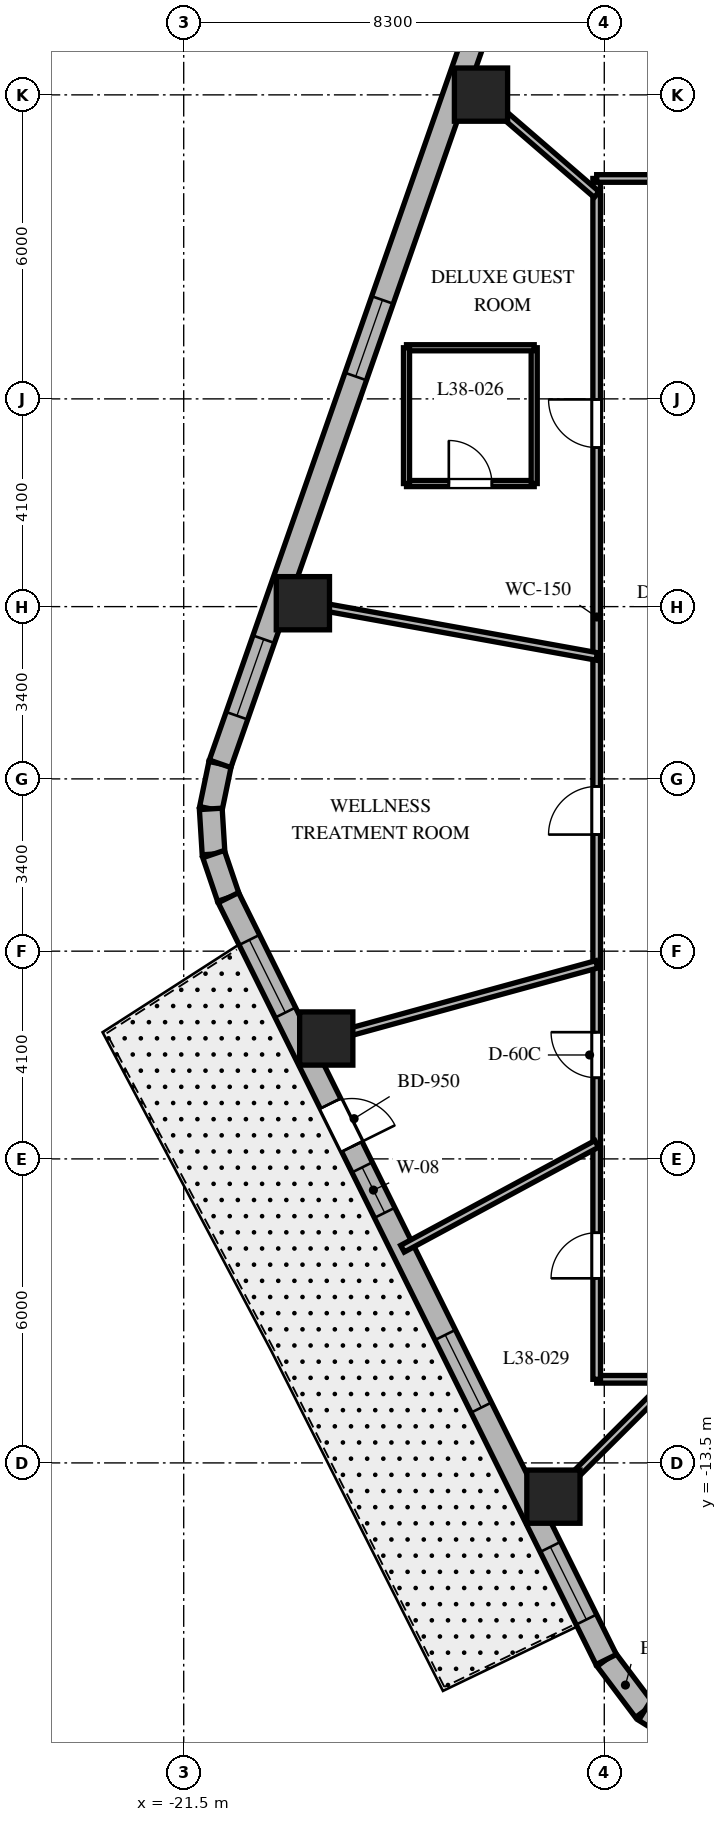
"""IFC4 building model, lengths in metres.
Left out: names, types, materials, properties, quantities, classifications, styles, units other than length and angle.
Written with IfcOpenShell. Run it as: python <this file> out.ifc"""

import sys

from ifc_helpers import new_model, si_unit, direction, frame, frame_2d, origin, origin_2d, place, context, subcontext, project, spatial, rectangle, extrude, element, fill, save


model = new_model("IFC4")
c1 = context("Model", 3, precision=1e-05, world=origin(), true_north=direction((0.0, 1.0)))
c2 = subcontext(c1, "Body", "Model", "MODEL_VIEW")
j1 = project(units=[si_unit("LENGTHUNIT", "METRE"), si_unit("PLANEANGLEUNIT", "RADIAN")], contexts=[c1])
p1 = place(None, origin())
s1 = spatial("IfcSite", under=j1, at=p1, CompositionType="ELEMENT")
p2 = place(p1, origin())
s2 = spatial("IfcBuilding", under=s1, at=p2, CompositionType="ELEMENT")
p3 = place(p2, frame((0.0, 0.0, 155.4)))
s3 = spatial("IfcBuildingStorey", under=s2, at=p3, CompositionType="ELEMENT", Elevation=155.4)
for number, where, z_axis, x_axis in (
    (1, (-15.633, 13.505, 0.0), (0.0, 0.0, 1.0), (1.0, 0.0, 0.0)),
    (2, (-19.148, 3.467, 0.0), (0.0, 0.0, 1.0), (1.0, 0.0, 0.0)),
    (3, (-18.687, -5.124, 0.0), (0.0, 0.0, 1.0), (1.0, 0.0, 0.0)),
    (4, (-14.204, -14.166, 0.0), (0.0, 0.0, 1.0), (1.0, 0.0, 0.0)),
):
    element("IfcColumn", number, at=place(p3, frame(where, z_axis=z_axis, x_axis=x_axis)), inside=s3, PredefinedType="COLUMN", context=c2, shape_type="SweptSolid", body=[
        extrude(rectangle(XDim=1.05, YDim=1.05, at=origin_2d()), origin(), (0.0, 0.0, 1.0), 3.7),
    ])
p4 = place(p3, frame((-13.162, -17.381, 0.0), z_axis=(0.0, 0.0, 1.0), x_axis=(0.601515770517, -0.798860925205, 0.0)))
e5 = element("IfcWall", 5, at=p4, inside=s3, PredefinedType="SOLIDWALL", context=c2, shape_type="SweptSolid", body=[
    extrude(rectangle(XDim=1.262, YDim=0.45, at=frame_2d((0.631, 0.0))), origin(), (0.0, 0.0, 1.0), 3.4),
])
p5 = place(p3, frame((-12.403, -18.389, 0.0), z_axis=(0.0, 0.0, 1.0), x_axis=(0.849795170926, -0.527113049991, 0.0)))
e6 = element("IfcWall", 6, at=p5, inside=s3, PredefinedType="SOLIDWALL", context=c2, shape_type="SweptSolid", body=[
    extrude(rectangle(XDim=1.241, YDim=0.45, at=frame_2d((0.62, 0.0))), origin(), (0.0, 0.0, 1.0), 3.4),
])
p6 = place(p3, frame((-20.782, 0.298, 0.0), z_axis=(0.0, 0.0, 1.0), x_axis=(-0.202570068411, -0.979267771033, 0.0)))
e7 = element("IfcWall", 7, at=p6, inside=s3, PredefinedType="SOLIDWALL", context=c2, shape_type="SweptSolid", body=[
    extrude(rectangle(XDim=0.909, YDim=0.45, at=frame_2d((0.454, 0.0))), origin(), (0.0, 0.0, 1.0), 3.4),
])
p7 = place(p3, frame((-20.966, -0.592, 0.0), z_axis=(0.0, 0.0, 1.0), x_axis=(0.061748898935, -0.998091715966, 0.0)))
e8 = element("IfcWall", 8, at=p7, inside=s3, PredefinedType="SOLIDWALL", context=c2, shape_type="SweptSolid", body=[
    extrude(rectangle(XDim=0.894, YDim=0.45, at=frame_2d((0.447, 0.0))), origin(), (0.0, 0.0, 1.0), 3.4),
])
p8 = place(p3, frame((-20.911, -1.484, 0.0), z_axis=(0.0, 0.0, 1.0), x_axis=(0.321623334353, -0.946867694453, 0.0)))
e9 = element("IfcWall", 9, at=p8, inside=s3, PredefinedType="SOLIDWALL", context=c2, shape_type="SweptSolid", body=[
    extrude(rectangle(XDim=0.909, YDim=0.45, at=frame_2d((0.454, 0.0))), origin(), (0.0, 0.0, 1.0), 3.4),
])
p9 = place(p3, frame((-14.937, 16.993, 0.0), z_axis=(0.0, 0.0, 1.0), x_axis=(-0.330431575061, -0.943829949834, 0.0)))
e10 = element("IfcWall", 10, at=p9, inside=s3, PredefinedType="SOLIDWALL", context=c2, shape_type="SweptSolid", body=[
    extrude(rectangle(XDim=17.689, YDim=0.45, at=frame_2d((8.844, 0.0))), origin(), (0.0, 0.0, 1.0), 3.4),
])
p10 = place(p9, frame((0.95, 0.0, 0.8)))
e11 = element("IfcOpeningElement", 11, at=p10, cuts=e10, PredefinedType="OPENING", context=c2, shape_type="SweptSolid", body=[
    extrude(rectangle(XDim=1.6, YDim=1.75, at=frame_2d((0.8, 0.875))), frame((0.0, 0.235, 0.0), z_axis=(0.0, -1.0, 0.0), x_axis=(1.0, 0.0, 0.0)), (0.0, 0.0, 1.0), 0.47),
])
p11 = place(p9, frame((7.99, 0.0, 0.8)))
e12 = element("IfcOpeningElement", 12, at=p11, cuts=e10, PredefinedType="OPENING", context=c2, shape_type="SweptSolid", body=[
    extrude(rectangle(XDim=1.6, YDim=1.75, at=frame_2d((0.8, 0.875))), frame((0.0, 0.235, 0.0), z_axis=(0.0, -1.0, 0.0), x_axis=(1.0, 0.0, 0.0)), (0.0, 0.0, 1.0), 0.47),
])
p12 = place(p9, frame((15.084, 0.0, 0.8)))
e13 = element("IfcOpeningElement", 13, at=p12, cuts=e10, PredefinedType="OPENING", context=c2, shape_type="SweptSolid", body=[
    extrude(rectangle(XDim=1.6, YDim=1.75, at=frame_2d((0.8, 0.875))), frame((0.0, 0.235, 0.0), z_axis=(0.0, -1.0, 0.0), x_axis=(1.0, 0.0, 0.0)), (0.0, 0.0, 1.0), 0.47),
])
p13 = place(p3, frame((-20.618, -2.344, 0.0), z_axis=(0.0, 0.0, 1.0), x_axis=(0.444243691097, -0.895905990002, 0.0)))
e14 = element("IfcWall", 14, at=p13, inside=s3, PredefinedType="SOLIDWALL", context=c2, shape_type="SweptSolid", body=[
    extrude(rectangle(XDim=16.784, YDim=0.45, at=frame_2d((8.392, 0.0))), origin(), (0.0, 0.0, 1.0), 3.4),
])
p14 = place(p13, frame((4.535, 0.0, 0.0)))
e15 = element("IfcOpeningElement", 15, at=p14, cuts=e14, PredefinedType="OPENING", context=c2, shape_type="SweptSolid", body=[
    extrude(rectangle(XDim=0.95, YDim=2.15, at=frame_2d((0.475, 1.075))), frame((0.0, 0.235, 0.0), z_axis=(0.0, -1.0, 0.0), x_axis=(1.0, 0.0, 0.0)), (0.0, 0.0, 1.0), 0.47),
])
p15 = place(p13, frame((0.931, 0.0, 0.8)))
e16 = element("IfcOpeningElement", 16, at=p15, cuts=e14, PredefinedType="OPENING", context=c2, shape_type="SweptSolid", body=[
    extrude(rectangle(XDim=1.6, YDim=1.75, at=frame_2d((0.8, 0.875))), frame((0.0, 0.235, 0.0), z_axis=(0.0, -1.0, 0.0), x_axis=(1.0, 0.0, 0.0)), (0.0, 0.0, 1.0), 0.47),
])
p16 = place(p13, frame((5.942, 0.0, 0.8)))
e17 = element("IfcOpeningElement", 17, at=p16, cuts=e14, PredefinedType="OPENING", context=c2, shape_type="SweptSolid", body=[
    extrude(rectangle(XDim=1.0, YDim=1.65, at=frame_2d((0.5, 0.825))), frame((0.0, 0.235, 0.0), z_axis=(0.0, -1.0, 0.0), x_axis=(1.0, 0.0, 0.0)), (0.0, 0.0, 1.0), 0.47),
])
p17 = place(p13, frame((9.633, 0.0, 0.8)))
e18 = element("IfcOpeningElement", 18, at=p17, cuts=e14, PredefinedType="OPENING", context=c2, shape_type="SweptSolid", body=[
    extrude(rectangle(XDim=1.6, YDim=1.75, at=frame_2d((0.8, 0.875))), frame((0.0, 0.235, 0.0), z_axis=(0.0, -1.0, 0.0), x_axis=(1.0, 0.0, 0.0)), (0.0, 0.0, 1.0), 0.47),
])
p18 = place(p13, frame((14.303, 0.0, 0.8)))
e19 = element("IfcOpeningElement", 19, at=p18, cuts=e14, PredefinedType="OPENING", context=c2, shape_type="SweptSolid", body=[
    extrude(rectangle(XDim=1.6, YDim=1.75, at=frame_2d((0.8, 0.875))), frame((0.0, 0.235, 0.0), z_axis=(0.0, -1.0, 0.0), x_axis=(1.0, 0.0, 0.0)), (0.0, 0.0, 1.0), 0.47),
])
p19 = place(p3, frame((13.35, -11.85, 0.0), z_axis=(0.0, 0.0, 1.0), x_axis=(-1.0, 0.0, 0.0)))
e20 = element("IfcWall", 20, at=p19, inside=s3, PredefinedType="PARTITIONING", context=c2, shape_type="SweptSolid", body=[
    extrude(rectangle(XDim=26.7, YDim=0.15, at=frame_2d((13.35, 0.0))), origin(), (0.0, 0.0, 1.0), 2.84),
])
p20 = place(p19, frame((20.682, 0.0, 0.0)))
e21 = element("IfcOpeningElement", 21, at=p20, cuts=e20, PredefinedType="OPENING", context=c2, shape_type="SweptSolid", body=[
    extrude(rectangle(XDim=0.95, YDim=2.03, at=frame_2d((0.475, 1.015))), frame((0.0, 0.085, 0.0), z_axis=(0.0, -1.0, 0.0), x_axis=(1.0, 0.0, 0.0)), (0.0, 0.0, 1.0), 0.17),
])
p21 = place(p19, frame((12.362, 0.0, 0.0)))
e22 = element("IfcOpeningElement", 22, at=p21, cuts=e20, PredefinedType="OPENING", context=c2, shape_type="SweptSolid", body=[
    extrude(rectangle(XDim=0.95, YDim=2.03, at=frame_2d((0.475, 1.015))), frame((0.0, 0.085, 0.0), z_axis=(0.0, -1.0, 0.0), x_axis=(1.0, 0.0, 0.0)), (0.0, 0.0, 1.0), 0.17),
])
p22 = place(p19, frame((3.995, 0.0, 0.0)))
e23 = element("IfcOpeningElement", 23, at=p22, cuts=e20, PredefinedType="OPENING", context=c2, shape_type="SweptSolid", body=[
    extrude(rectangle(XDim=0.95, YDim=2.03, at=frame_2d((0.475, 1.015))), frame((0.0, 0.085, 0.0), z_axis=(0.0, -1.0, 0.0), x_axis=(1.0, 0.0, 0.0)), (0.0, 0.0, 1.0), 0.17),
])
p23 = place(p3, frame((-13.35, -11.85, 0.0), z_axis=(0.0, 0.0, 1.0), x_axis=(0.0, 1.0, 0.0)))
e24 = element("IfcWall", 24, at=p23, inside=s3, PredefinedType="PARTITIONING", context=c2, shape_type="SweptSolid", body=[
    extrude(rectangle(XDim=23.7, YDim=0.15, at=frame_2d((11.85, 0.0))), origin(), (0.0, 0.0, 1.0), 2.84),
])
p24 = place(p23, frame((18.389, 0.0, 0.0)))
e25 = element("IfcOpeningElement", 25, at=p24, cuts=e24, PredefinedType="OPENING", context=c2, shape_type="SweptSolid", body=[
    extrude(rectangle(XDim=0.95, YDim=2.03, at=frame_2d((0.475, 1.015))), frame((0.0, 0.085, 0.0), z_axis=(0.0, -1.0, 0.0), x_axis=(1.0, 0.0, 0.0)), (0.0, 0.0, 1.0), 0.17),
])
p25 = place(p23, frame((10.751, 0.0, 0.0)))
e26 = element("IfcOpeningElement", 26, at=p25, cuts=e24, PredefinedType="OPENING", context=c2, shape_type="SweptSolid", body=[
    extrude(rectangle(XDim=0.95, YDim=2.03, at=frame_2d((0.475, 1.015))), frame((0.0, 0.085, 0.0), z_axis=(0.0, -1.0, 0.0), x_axis=(1.0, 0.0, 0.0)), (0.0, 0.0, 1.0), 0.17),
])
p26 = place(p23, frame((5.951, 0.0, 0.0)))
e27 = element("IfcOpeningElement", 27, at=p26, cuts=e24, PredefinedType="OPENING", context=c2, shape_type="SweptSolid", body=[
    extrude(rectangle(XDim=0.9, YDim=2.03, at=frame_2d((0.45, 1.015))), frame((0.0, 0.085, 0.0), z_axis=(0.0, -1.0, 0.0), x_axis=(1.0, 0.0, 0.0)), (0.0, 0.0, 1.0), 0.17),
])
p27 = place(p23, frame((1.993, 0.0, 0.0)))
e28 = element("IfcOpeningElement", 28, at=p27, cuts=e24, PredefinedType="OPENING", context=c2, shape_type="SweptSolid", body=[
    extrude(rectangle(XDim=0.9, YDim=2.03, at=frame_2d((0.45, 1.015))), frame((0.0, 0.085, 0.0), z_axis=(0.0, -1.0, 0.0), x_axis=(1.0, 0.0, 0.0)), (0.0, 0.0, 1.0), 0.17),
])
p28 = place(p3, frame((-13.35, 11.85, 0.0), z_axis=(0.0, 0.0, 1.0), x_axis=(1.0, 0.0, 0.0)))
e29 = element("IfcWall", 29, at=p28, inside=s3, PredefinedType="PARTITIONING", context=c2, shape_type="SweptSolid", body=[
    extrude(rectangle(XDim=26.7, YDim=0.15, at=frame_2d((13.35, 0.0))), origin(), (0.0, 0.0, 1.0), 2.84),
])
p29 = place(p28, frame((20.682, 0.0, 0.0)))
e30 = element("IfcOpeningElement", 30, at=p29, cuts=e29, PredefinedType="OPENING", context=c2, shape_type="SweptSolid", body=[
    extrude(rectangle(XDim=0.95, YDim=2.03, at=frame_2d((0.475, 1.015))), frame((0.0, 0.085, 0.0), z_axis=(0.0, -1.0, 0.0), x_axis=(1.0, 0.0, 0.0)), (0.0, 0.0, 1.0), 0.17),
])
p30 = place(p28, frame((14.229, 0.0, 0.0)))
e31 = element("IfcOpeningElement", 31, at=p30, cuts=e29, PredefinedType="OPENING", context=c2, shape_type="SweptSolid", body=[
    extrude(rectangle(XDim=0.95, YDim=2.03, at=frame_2d((0.475, 1.015))), frame((0.0, 0.085, 0.0), z_axis=(0.0, -1.0, 0.0), x_axis=(1.0, 0.0, 0.0)), (0.0, 0.0, 1.0), 0.17),
])
p31 = place(p28, frame((10.075, 0.0, 0.0)))
e32 = element("IfcOpeningElement", 32, at=p31, cuts=e29, PredefinedType="OPENING", context=c2, shape_type="SweptSolid", body=[
    extrude(rectangle(XDim=0.95, YDim=2.03, at=frame_2d((0.475, 1.015))), frame((0.0, 0.085, 0.0), z_axis=(0.0, -1.0, 0.0), x_axis=(1.0, 0.0, 0.0)), (0.0, 0.0, 1.0), 0.17),
])
p32 = place(p28, frame((3.995, 0.0, 0.0)))
e33 = element("IfcOpeningElement", 33, at=p32, cuts=e29, PredefinedType="OPENING", context=c2, shape_type="SweptSolid", body=[
    extrude(rectangle(XDim=0.95, YDim=2.03, at=frame_2d((0.475, 1.015))), frame((0.0, 0.085, 0.0), z_axis=(0.0, -1.0, 0.0), x_axis=(1.0, 0.0, 0.0)), (0.0, 0.0, 1.0), 0.17),
])
p33 = place(p3, frame((-13.35, 11.533, 0.0), z_axis=(0.0, 0.0, 1.0), x_axis=(-0.756711647314, 0.65374879183, 0.0)))
e34 = element("IfcWall", 34, at=p33, inside=s3, PredefinedType="PARTITIONING", context=c2, shape_type="SweptSolid", body=[
    extrude(rectangle(XDim=3.55, YDim=0.15, at=frame_2d((1.775, 0.0))), origin(), (0.0, 0.0, 1.0), 2.64),
])
p34 = place(p3, frame((-13.35, 2.417, 0.0), z_axis=(0.0, 0.0, 1.0), x_axis=(-0.98399796473, 0.178179699761, 0.0)))
e35 = element("IfcWall", 35, at=p34, inside=s3, PredefinedType="PARTITIONING", context=c2, shape_type="SweptSolid", body=[
    extrude(rectangle(XDim=6.393, YDim=0.15, at=frame_2d((3.197, 0.0))), origin(), (0.0, 0.0, 1.0), 2.64),
])
p35 = place(p3, frame((-13.35, -3.661, 0.0), z_axis=(0.0, 0.0, 1.0), x_axis=(-0.964397145454, -0.264458211898, 0.0)))
e36 = element("IfcWall", 36, at=p35, inside=s3, PredefinedType="PARTITIONING", context=c2, shape_type="SweptSolid", body=[
    extrude(rectangle(XDim=6.039, YDim=0.15, at=frame_2d((3.019, 0.0))), origin(), (0.0, 0.0, 1.0), 2.64),
])
p36 = place(p3, frame((-13.35, -7.204, 0.0), z_axis=(0.0, 0.0, 1.0), x_axis=(-0.880033329067, -0.474911928394, 0.0)))
e37 = element("IfcWall", 37, at=p36, inside=s3, PredefinedType="PARTITIONING", context=c2, shape_type="SweptSolid", body=[
    extrude(rectangle(XDim=4.355, YDim=0.15, at=frame_2d((2.178, 0.0))), origin(), (0.0, 0.0, 1.0), 2.64),
])
p37 = place(p3, frame((-11.882, -11.85, 0.0), z_axis=(0.0, 0.0, 1.0), x_axis=(-0.708037373639, -0.706174962407, 0.0)))
e38 = element("IfcWall", 38, at=p37, inside=s3, PredefinedType="PARTITIONING", context=c2, shape_type="SweptSolid", body=[
    extrude(rectangle(XDim=3.802, YDim=0.15, at=frame_2d((1.901, 0.0))), origin(), (0.0, 0.0, 1.0), 2.64),
])
p38 = place(p3, frame((-17.103, 5.829, 0.0), z_axis=(0.0, 0.0, 1.0), x_axis=(1.0, 0.0, 0.0)))
e39 = element("IfcWall", 39, at=p38, inside=s3, PredefinedType="PARTITIONING", context=c2, shape_type="SweptSolid", body=[
    extrude(rectangle(XDim=2.52, YDim=0.12, at=frame_2d((1.26, 0.0))), origin(), (0.0, 0.0, 1.0), 2.972),
])
p39 = place(p38, frame((0.835, 0.0, 0.0)))
e40 = element("IfcOpeningElement", 40, at=p39, cuts=e39, PredefinedType="OPENING", context=c2, shape_type="SweptSolid", body=[
    extrude(rectangle(XDim=0.85, YDim=2.03, at=frame_2d((0.425, 1.015))), frame((0.0, 0.07, 0.0), z_axis=(0.0, -1.0, 0.0), x_axis=(1.0, 0.0, 0.0)), (0.0, 0.0, 1.0), 0.14),
])
p40 = place(p3, frame((-14.583, 5.829, 0.0), z_axis=(0.0, 0.0, 1.0), x_axis=(0.0, 1.0, 0.0)))
e41 = element("IfcWall", 41, at=p40, inside=s3, PredefinedType="PARTITIONING", context=c2, shape_type="SweptSolid", body=[
    extrude(rectangle(XDim=2.68, YDim=0.12, at=frame_2d((1.34, 0.0))), origin(), (0.0, 0.0, 1.0), 2.972),
])
p41 = place(p3, frame((-14.583, 8.509, 0.0), z_axis=(0.0, 0.0, 1.0), x_axis=(-1.0, 0.0, 0.0)))
e42 = element("IfcWall", 42, at=p41, inside=s3, PredefinedType="PARTITIONING", context=c2, shape_type="SweptSolid", body=[
    extrude(rectangle(XDim=2.52, YDim=0.12, at=frame_2d((1.26, 0.0))), origin(), (0.0, 0.0, 1.0), 2.972),
])
p42 = place(p3, frame((-17.103, 8.509, 0.0), z_axis=(0.0, 0.0, 1.0), x_axis=(0.0, -1.0, 0.0)))
e43 = element("IfcWall", 43, at=p42, inside=s3, PredefinedType="PARTITIONING", context=c2, shape_type="SweptSolid", body=[
    extrude(rectangle(XDim=2.68, YDim=0.12, at=frame_2d((1.34, 0.0))), origin(), (0.0, 0.0, 1.0), 2.64),
])
p43 = place(p11, origin())
e44 = element("IfcWindow", 44, at=p43, inside=s3, PartitioningType="SINGLE_PANEL", PredefinedType="WINDOW", context=c2, shape_type="SweptSolid", body=[
    extrude(rectangle(XDim=1.6, YDim=1.75, at=frame_2d((0.8, 0.875))), frame((0.0, 0.03, 0.0), z_axis=(0.0, -1.0, 0.0), x_axis=(1.0, 0.0, 0.0)), (0.0, 0.0, 1.0), 0.06),
])
fill(e12, e44)
p44 = place(p12, origin())
e45 = element("IfcWindow", 45, at=p44, inside=s3, PartitioningType="SINGLE_PANEL", PredefinedType="WINDOW", context=c2, shape_type="SweptSolid", body=[
    extrude(rectangle(XDim=1.6, YDim=1.75, at=frame_2d((0.8, 0.875))), frame((0.0, 0.03, 0.0), z_axis=(0.0, -1.0, 0.0), x_axis=(1.0, 0.0, 0.0)), (0.0, 0.0, 1.0), 0.06),
])
fill(e13, e45)
p45 = place(p14, origin())
e46 = element("IfcDoor", 46, at=p45, inside=s3, OperationType="SINGLE_SWING_RIGHT", PredefinedType="DOOR", context=c2, shape_type="SweptSolid", body=[
    extrude(rectangle(XDim=0.95, YDim=2.15, at=frame_2d((0.475, 1.075))), frame((0.0, 0.025, 0.0), z_axis=(0.0, -1.0, 0.0), x_axis=(1.0, 0.0, 0.0)), (0.0, 0.0, 1.0), 0.05),
])
fill(e15, e46)
p46 = place(p15, origin())
e47 = element("IfcWindow", 47, at=p46, inside=s3, PartitioningType="SINGLE_PANEL", PredefinedType="WINDOW", context=c2, shape_type="SweptSolid", body=[
    extrude(rectangle(XDim=1.6, YDim=1.75, at=frame_2d((0.8, 0.875))), frame((0.0, 0.03, 0.0), z_axis=(0.0, -1.0, 0.0), x_axis=(1.0, 0.0, 0.0)), (0.0, 0.0, 1.0), 0.06),
])
fill(e16, e47)
p47 = place(p16, origin())
e48 = element("IfcWindow", 48, at=p47, inside=s3, PartitioningType="SINGLE_PANEL", PredefinedType="WINDOW", context=c2, shape_type="SweptSolid", body=[
    extrude(rectangle(XDim=1.0, YDim=1.65, at=frame_2d((0.5, 0.825))), frame((0.0, 0.03, 0.0), z_axis=(0.0, -1.0, 0.0), x_axis=(1.0, 0.0, 0.0)), (0.0, 0.0, 1.0), 0.06),
])
fill(e17, e48)
p48 = place(p17, origin())
e49 = element("IfcWindow", 49, at=p48, inside=s3, PartitioningType="SINGLE_PANEL", PredefinedType="WINDOW", context=c2, shape_type="SweptSolid", body=[
    extrude(rectangle(XDim=1.6, YDim=1.75, at=frame_2d((0.8, 0.875))), frame((0.0, 0.03, 0.0), z_axis=(0.0, -1.0, 0.0), x_axis=(1.0, 0.0, 0.0)), (0.0, 0.0, 1.0), 0.06),
])
fill(e18, e49)
p49 = place(p18, origin())
e50 = element("IfcWindow", 50, at=p49, inside=s3, PartitioningType="SINGLE_PANEL", PredefinedType="WINDOW", context=c2, shape_type="SweptSolid", body=[
    extrude(rectangle(XDim=1.6, YDim=1.75, at=frame_2d((0.8, 0.875))), frame((0.0, 0.03, 0.0), z_axis=(0.0, -1.0, 0.0), x_axis=(1.0, 0.0, 0.0)), (0.0, 0.0, 1.0), 0.06),
])
fill(e19, e50)
p50 = place(p24, origin())
e51 = element("IfcDoor", 51, at=p50, inside=s3, OperationType="SINGLE_SWING_RIGHT", PredefinedType="DOOR", context=c2, shape_type="SweptSolid", body=[
    extrude(rectangle(XDim=0.95, YDim=2.03, at=frame_2d((0.475, 1.015))), frame((0.0, 0.025, 0.0), z_axis=(0.0, -1.0, 0.0), x_axis=(1.0, 0.0, 0.0)), (0.0, 0.0, 1.0), 0.05),
])
fill(e25, e51)
p51 = place(p39, origin())
e52 = element("IfcDoor", 52, at=p51, inside=s3, OperationType="SINGLE_SWING_LEFT", PredefinedType="DOOR", context=c2, shape_type="SweptSolid", body=[
    extrude(rectangle(XDim=0.85, YDim=2.03, at=frame_2d((0.425, 1.015))), frame((0.0, 0.025, 0.0), z_axis=(0.0, -1.0, 0.0), x_axis=(1.0, 0.0, 0.0)), (0.0, 0.0, 1.0), 0.05),
])
fill(e40, e52)
p52 = place(p25, origin())
e53 = element("IfcDoor", 53, at=p52, inside=s3, OperationType="SINGLE_SWING_LEFT", PredefinedType="DOOR", context=c2, shape_type="SweptSolid", body=[
    extrude(rectangle(XDim=0.95, YDim=2.03, at=frame_2d((0.475, 1.015))), frame((0.0, 0.025, 0.0), z_axis=(0.0, -1.0, 0.0), x_axis=(1.0, 0.0, 0.0)), (0.0, 0.0, 1.0), 0.05),
])
fill(e26, e53)
p53 = place(p26, origin())
e54 = element("IfcDoor", 54, at=p53, inside=s3, OperationType="SINGLE_SWING_RIGHT", PredefinedType="DOOR", context=c2, shape_type="SweptSolid", body=[
    extrude(rectangle(XDim=0.9, YDim=2.03, at=frame_2d((0.45, 1.015))), frame((0.0, 0.025, 0.0), z_axis=(0.0, -1.0, 0.0), x_axis=(1.0, 0.0, 0.0)), (0.0, 0.0, 1.0), 0.05),
])
fill(e27, e54)
p54 = place(p27, origin())
e55 = element("IfcDoor", 55, at=p54, inside=s3, OperationType="SINGLE_SWING_LEFT", PredefinedType="DOOR", context=c2, shape_type="SweptSolid", body=[
    extrude(rectangle(XDim=0.9, YDim=2.03, at=frame_2d((0.45, 1.015))), frame((0.0, 0.025, 0.0), z_axis=(0.0, -1.0, 0.0), x_axis=(1.0, 0.0, 0.0)), (0.0, 0.0, 1.0), 0.05),
])
fill(e28, e55)
save(model, sys.argv[1])
